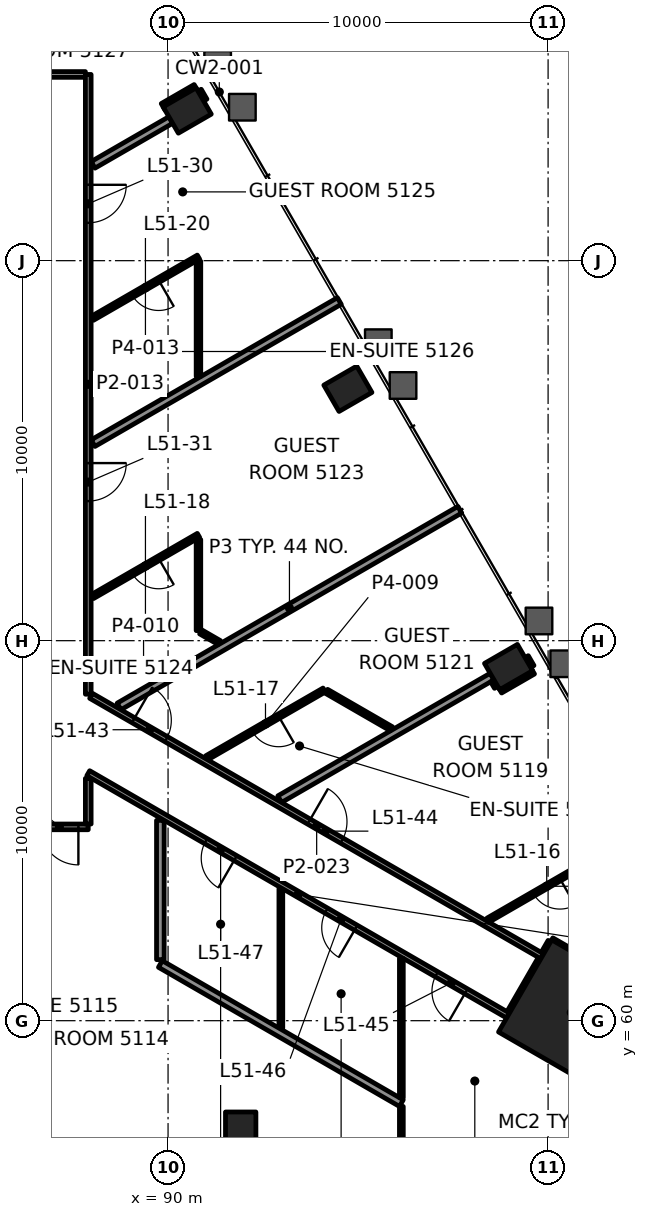
"""IFC4 building model, lengths in metres.
Left out: names, types, materials, properties, quantities, classifications, styles, units other than length and angle.
Written with IfcOpenShell. Run it as: python <this file> out.ifc"""

import sys

from ifc_helpers import new_model, si_unit, direction, frame, frame_2d, origin, origin_2d, place, context, subcontext, project, spatial, rectangle, hollow_rectangle, extrude, element, fill, save


model = new_model("IFC4")
c1 = context("Model", 3, precision=1e-05, world=origin(), true_north=direction((0.0, 1.0)))
c2 = subcontext(c1, "Body", "Model", "MODEL_VIEW")
j1 = project(units=[si_unit("LENGTHUNIT", "METRE"), si_unit("PLANEANGLEUNIT", "RADIAN")], contexts=[c1])
p1 = place(None, origin())
s1 = spatial("IfcSite", under=j1, at=p1, CompositionType="ELEMENT")
p2 = place(p1, origin())
s2 = spatial("IfcBuilding", under=s1, at=p2, CompositionType="ELEMENT")
p3 = place(p2, frame((0.0, 0.0, 218.2)))
s3 = spatial("IfcBuildingStorey", under=s2, at=p3, CompositionType="ELEMENT", Elevation=218.2)
p4 = place(p3, frame((100.608, 60.215, 0.0), z_axis=(0.0, 0.0, 1.0), x_axis=(0.5, 0.866025403784, 0.0)))
e1 = element("IfcColumn", 1, at=p4, inside=s3, PredefinedType="COLUMN", context=c2, shape_type="SweptSolid", body=[
    extrude(rectangle(XDim=2.8, YDim=2.8, at=origin_2d()), origin(), (0.0, 0.0, 1.0), 3.9),
])
for number, where, z_axis, x_axis in (
    (2, (91.911, 57.097, -0.0), (0.0, 0.0, 1.0), (1.0, 0.0, 0.0)),
    (3, (98.96, 69.306, -0.0), (0.0, 0.0, 1.0), (-0.5, 0.866, 0.0)),
    (4, (94.732, 76.628, -0.0), (0.0, 0.0, 1.0), (-0.5, 0.866, 0.0)),
    (5, (90.504, 83.951, -0.0), (0.0, 0.0, 1.0), (-0.5, 0.866, 0.0)),
):
    element("IfcColumn", number, at=place(p3, frame(where, z_axis=z_axis, x_axis=x_axis)), inside=s3, PredefinedType="COLUMN", context=c2, shape_type="SweptSolid", body=[
        extrude(hollow_rectangle(XDim=0.8, YDim=1.0, WallThickness=0.05, at=origin_2d()), origin(), (0.0, 0.0, 1.0), 3.9),
    ])
p5 = place(p3, frame((87.899, 65.1, 0.0), z_axis=(0.0, 0.0, 1.0), x_axis=(-1.0, 0.0, 0.0)))
e6 = element("IfcWall", 6, at=p5, inside=s3, PredefinedType="PARTITIONING", context=c2, shape_type="SweptSolid", body=[
    extrude(rectangle(XDim=25.799, YDim=0.15, at=frame_2d((12.899, 0.0))), origin(), (0.0, 0.0, 1.0), 3.1),
])
p6 = place(p5, frame((0.259, 0.0, 0.0)))
e7 = element("IfcOpeningElement", 7, at=p6, cuts=e6, PredefinedType="OPENING", context=c2, shape_type="SweptSolid", body=[
    extrude(rectangle(XDim=1.0, YDim=2.1, at=frame_2d((0.5, 1.05))), frame((0.0, 0.085, 0.0), z_axis=(0.0, -1.0, 0.0), x_axis=(1.0, 0.0, 0.0)), (0.0, 0.0, 1.0), 0.17),
])
p7 = place(p5, frame((4.641, 0.0, 0.0)))
e8 = element("IfcOpeningElement", 8, at=p7, cuts=e6, PredefinedType="OPENING", context=c2, shape_type="SweptSolid", body=[
    extrude(rectangle(XDim=1.0, YDim=2.1, at=frame_2d((0.5, 1.05))), frame((0.0, 0.085, 0.0), z_axis=(0.0, -1.0, 0.0), x_axis=(1.0, 0.0, 0.0)), (0.0, 0.0, 1.0), 0.17),
])
p8 = place(p5, frame((8.868, 0.0, 0.0)))
e9 = element("IfcOpeningElement", 9, at=p8, cuts=e6, PredefinedType="OPENING", context=c2, shape_type="SweptSolid", body=[
    extrude(rectangle(XDim=1.0, YDim=2.1, at=frame_2d((0.5, 1.05))), frame((0.0, 0.085, 0.0), z_axis=(0.0, -1.0, 0.0), x_axis=(1.0, 0.0, 0.0)), (0.0, 0.0, 1.0), 0.17),
])
p9 = place(p5, frame((13.271, 0.0, 0.0)))
e10 = element("IfcOpeningElement", 10, at=p9, cuts=e6, PredefinedType="OPENING", context=c2, shape_type="SweptSolid", body=[
    extrude(rectangle(XDim=1.0, YDim=2.1, at=frame_2d((0.5, 1.05))), frame((0.0, 0.085, 0.0), z_axis=(0.0, -1.0, 0.0), x_axis=(1.0, 0.0, 0.0)), (0.0, 0.0, 1.0), 0.17),
])
p10 = place(p5, frame((19.612, 0.0, 0.0)))
e11 = element("IfcOpeningElement", 11, at=p10, cuts=e6, PredefinedType="OPENING", context=c2, shape_type="SweptSolid", body=[
    extrude(rectangle(XDim=1.0, YDim=2.1, at=frame_2d((0.5, 1.05))), frame((0.0, 0.085, 0.0), z_axis=(0.0, -1.0, 0.0), x_axis=(1.0, 0.0, 0.0)), (0.0, 0.0, 1.0), 0.17),
])
p11 = place(p3, frame((78.275, 84.9, 0.0), z_axis=(0.0, 0.0, 1.0), x_axis=(1.0, 0.0, 0.0)))
e12 = element("IfcWall", 12, at=p11, inside=s3, PredefinedType="PARTITIONING", context=c2, shape_type="SweptSolid", body=[
    extrude(rectangle(XDim=9.55, YDim=0.15, at=frame_2d((4.775, 0.0))), origin(), (0.0, 0.0, 1.0), 3.097),
])
p12 = place(p11, frame((5.191, 0.0, 0.0)))
e13 = element("IfcOpeningElement", 13, at=p12, cuts=e12, PredefinedType="OPENING", context=c2, shape_type="SweptSolid", body=[
    extrude(rectangle(XDim=1.0, YDim=2.1, at=frame_2d((0.5, 1.05))), frame((0.0, 0.085, 0.0), z_axis=(0.0, -1.0, 0.0), x_axis=(1.0, 0.0, 0.0)), (0.0, 0.0, 1.0), 0.17),
])
p13 = place(p3, frame((101.509, 64.429, 0.0), z_axis=(0.0, 0.0, 1.0), x_axis=(-0.866028357664, -0.499994883695, 0.0)))
e14 = element("IfcWall", 14, at=p13, inside=s3, PredefinedType="PARTITIONING", context=c2, shape_type="SweptSolid", body=[
    extrude(rectangle(XDim=3.568, YDim=0.12, at=frame_2d((1.784, 0.0))), origin(), (0.0, 0.0, 1.0), 3.1),
])
p14 = place(p13, frame((1.384, 0.0, 0.0)))
e15 = element("IfcOpeningElement", 15, at=p14, cuts=e14, PredefinedType="OPENING", context=c2, shape_type="SweptSolid", body=[
    extrude(rectangle(XDim=0.8, YDim=2.1, at=frame_2d((0.4, 1.05))), frame((0.0, 0.07, 0.0), z_axis=(0.0, -1.0, 0.0), x_axis=(1.0, 0.0, 0.0)), (0.0, 0.0, 1.0), 0.14),
])
p15 = place(p3, frame((98.727, 68.71, 0.0), z_axis=(0.0, 0.0, 1.0), x_axis=(0.866083827272, 0.499898793895, 0.0)))
e16 = element("IfcWall", 16, at=p15, inside=s3, PredefinedType="PARTITIONING", context=c2, shape_type="SweptSolid", body=[
    extrude(rectangle(XDim=0.999, YDim=0.2, at=frame_2d((0.5, 0.0))), origin(), (0.0, 0.0, 1.0), 3.1),
])
p16 = place(p3, frame((92.938, 65.83, 0.0), z_axis=(0.0, 0.0, 1.0), x_axis=(0.866041300655, 0.499972464802, 0.0)))
e17 = element("IfcWall", 17, at=p16, inside=s3, PredefinedType="PARTITIONING", context=c2, shape_type="SweptSolid", body=[
    extrude(rectangle(XDim=6.452, YDim=0.2, at=frame_2d((3.226, 0.0))), origin(), (0.0, 0.0, 1.0), 3.1),
])
p17 = place(p3, frame((94.109, 68.702, 0.0), z_axis=(0.0, 0.0, 1.0), x_axis=(-0.866028357664, -0.499994883695, 0.0)))
e18 = element("IfcWall", 18, at=p17, inside=s3, PredefinedType="PARTITIONING", context=c2, shape_type="SweptSolid", body=[
    extrude(rectangle(XDim=3.568, YDim=0.12, at=frame_2d((1.784, 0.0))), origin(), (0.0, 0.0, 1.0), 3.1),
])
p18 = place(p17, frame((1.384, 0.0, 0.0)))
e19 = element("IfcOpeningElement", 19, at=p18, cuts=e18, PredefinedType="OPENING", context=c2, shape_type="SweptSolid", body=[
    extrude(rectangle(XDim=0.8, YDim=2.1, at=frame_2d((0.4, 1.05))), frame((0.0, 0.07, 0.0), z_axis=(0.0, -1.0, 0.0), x_axis=(1.0, 0.0, 0.0)), (0.0, 0.0, 1.0), 0.14),
])
p19 = place(p3, frame((88.711, 68.27, 0.0), z_axis=(0.0, 0.0, 1.0), x_axis=(0.866024593981, 0.500001402618, 0.0)))
e20 = element("IfcWall", 20, at=p19, inside=s3, PredefinedType="PARTITIONING", context=c2, shape_type="SweptSolid", body=[
    extrude(rectangle(XDim=10.354, YDim=0.2, at=frame_2d((5.177, 0.0))), origin(), (0.0, 0.0, 1.0), 3.022),
])
p20 = place(p3, frame((90.8, 72.771, 0.0), z_axis=(0.0, 0.0, 1.0), x_axis=(-0.86604299788, -0.499969524894, 0.0)))
e21 = element("IfcWall", 21, at=p20, inside=s3, PredefinedType="PARTITIONING", context=c2, shape_type="SweptSolid", body=[
    extrude(rectangle(XDim=3.222, YDim=0.12, at=frame_2d((1.611, 0.0))), origin(), (0.0, 0.0, 1.0), 3.1),
])
p21 = place(p20, frame((1.211, 0.0, 0.0)))
e22 = element("IfcOpeningElement", 22, at=p21, cuts=e21, PredefinedType="OPENING", context=c2, shape_type="SweptSolid", body=[
    extrude(rectangle(XDim=0.8, YDim=2.1, at=frame_2d((0.4, 1.05))), frame((0.0, 0.07, 0.0), z_axis=(0.0, -1.0, 0.0), x_axis=(1.0, 0.0, 0.0)), (0.0, 0.0, 1.0), 0.14),
])
p22 = place(p3, frame((88.027, 75.198, 0.0), z_axis=(0.0, 0.0, 1.0), x_axis=(0.866029625778, 0.499992687221, 0.0)))
e23 = element("IfcWall", 23, at=p22, inside=s3, PredefinedType="PARTITIONING", context=c2, shape_type="SweptSolid", body=[
    extrude(rectangle(XDim=7.481, YDim=0.2, at=frame_2d((3.741, 0.0))), origin(), (0.0, 0.0, 1.0), 3.022),
])
p23 = place(p3, frame((90.8, 80.095, 0.0), z_axis=(0.0, 0.0, 1.0), x_axis=(-0.866029130051, -0.499993545862, 0.0)))
e24 = element("IfcWall", 24, at=p23, inside=s3, PredefinedType="PARTITIONING", context=c2, shape_type="SweptSolid", body=[
    extrude(rectangle(XDim=3.222, YDim=0.12, at=frame_2d((1.611, 0.0))), origin(), (0.0, 0.0, 1.0), 3.1),
])
p24 = place(p23, frame((1.211, 0.0, 0.0)))
e25 = element("IfcOpeningElement", 25, at=p24, cuts=e24, PredefinedType="OPENING", context=c2, shape_type="SweptSolid", body=[
    extrude(rectangle(XDim=0.8, YDim=2.1, at=frame_2d((0.4, 1.05))), frame((0.0, 0.07, 0.0), z_axis=(0.0, -1.0, 0.0), x_axis=(1.0, 0.0, 0.0)), (0.0, 0.0, 1.0), 0.14),
])
p25 = place(p3, frame((88.027, 82.521, 0.0), z_axis=(0.0, 0.0, 1.0), x_axis=(0.866032292145, 0.49998806882, 0.0)))
e26 = element("IfcWall", 26, at=p25, inside=s3, PredefinedType="PARTITIONING", context=c2, shape_type="SweptSolid", body=[
    extrude(rectangle(XDim=2.36, YDim=0.2, at=frame_2d((1.18, 0.0))), origin(), (0.0, 0.0, 1.0), 3.1),
])
p26 = place(p3, frame((89.871, 84.048, 0.0), z_axis=(0.0, 0.0, 1.0), x_axis=(0.866010750942, 0.50002537861, 0.0)))
e27 = element("IfcWall", 27, at=p26, inside=s3, PredefinedType="PARTITIONING", context=c2, shape_type="SweptSolid", body=[
    extrude(rectangle(XDim=1.0, YDim=0.2, at=frame_2d((0.5, 0.0))), origin(), (0.0, 0.0, 1.0), 3.022),
])
p27 = place(p3, frame((98.984, 60.201, 0.0), z_axis=(0.0, 0.0, 1.0), x_axis=(0.499991515992, 0.866030301974, 0.0)))
e28 = element("IfcWall", 28, at=p27, inside=s3, PredefinedType="PARTITIONING", context=c2, shape_type="SweptSolid", body=[
    extrude(rectangle(XDim=1.649, YDim=0.15, at=frame_2d((0.825, 0.0))), origin(), (0.0, 0.0, 1.0), 2.947),
])
p28 = place(p3, frame((96.139, 56.137, 0.0), z_axis=(0.0, 0.0, 1.0), x_axis=(0.0, 1.0, 0.0)))
e29 = element("IfcWall", 29, at=p28, inside=s3, PredefinedType="PARTITIONING", context=c2, shape_type="SweptSolid", body=[
    extrude(rectangle(XDim=1.606, YDim=0.1, at=frame_2d((0.803, 0.0))), origin(), (0.0, 0.0, 1.0), 3.1),
])
p29 = place(p3, frame((92.968, 59.806, 0.0), z_axis=(0.0, 0.0, 1.0), x_axis=(0.0, 1.0, 0.0)))
e30 = element("IfcWall", 30, at=p29, inside=s3, PredefinedType="PARTITIONING", context=c2, shape_type="SweptSolid", body=[
    extrude(rectangle(XDim=3.664, YDim=0.1, at=frame_2d((1.832, 0.0))), origin(), (0.0, 0.0, 1.0), 3.1),
])
p30 = place(p3, frame((90.8, 70.266, 0.0), z_axis=(0.0, 0.0, 1.0), x_axis=(0.0, 1.0, 0.0)))
e31 = element("IfcWall", 31, at=p30, inside=s3, PredefinedType="PARTITIONING", context=c2, shape_type="SweptSolid", body=[
    extrude(rectangle(XDim=2.397, YDim=0.12, at=frame_2d((1.198, 0.0))), origin(), (0.0, 0.0, 1.0), 3.1),
])
p31 = place(p3, frame((90.8, 76.955, 0.0), z_axis=(0.0, 0.0, 1.0), x_axis=(0.0, 1.0, 0.0)))
e32 = element("IfcWall", 32, at=p31, inside=s3, PredefinedType="PARTITIONING", context=c2, shape_type="SweptSolid", body=[
    extrude(rectangle(XDim=3.031, YDim=0.12, at=frame_2d((1.515, 0.0))), origin(), (0.0, 0.0, 1.0), 3.1),
])
p32 = place(p3, frame((89.797, 61.607, 0.0), z_axis=(0.0, 0.0, 1.0), x_axis=(0.0, 1.0, 0.0)))
e33 = element("IfcWall", 33, at=p32, inside=s3, PredefinedType="PARTITIONING", context=c2, shape_type="SweptSolid", body=[
    extrude(rectangle(XDim=3.664, YDim=0.2, at=frame_2d((1.832, 0.0))), origin(), (0.0, 0.0, 1.0), 2.947),
])
p33 = place(p3, frame((87.9, 65.176, 0.0), z_axis=(0.0, 0.0, 1.0), x_axis=(0.0, 1.0, 0.0)))
e34 = element("IfcWall", 34, at=p33, inside=s3, PredefinedType="PARTITIONING", context=c2, shape_type="SweptSolid", body=[
    extrude(rectangle(XDim=1.201, YDim=0.15, at=frame_2d((0.6, 0.0))), origin(), (0.0, 0.0, 1.0), 2.947),
])
p34 = place(p3, frame((87.9, 84.9, 0.0), z_axis=(0.0, 0.0, 1.0), x_axis=(0.0, -1.0, 0.0)))
e35 = element("IfcWall", 35, at=p34, inside=s3, PredefinedType="PARTITIONING", context=c2, shape_type="SweptSolid", body=[
    extrude(rectangle(XDim=16.309, YDim=0.15, at=frame_2d((8.154, 0.0))), origin(), (0.0, 0.0, 1.0), 3.1),
])
p35 = place(p34, frame((2.904, 0.0, 0.0)))
e36 = element("IfcOpeningElement", 36, at=p35, cuts=e35, PredefinedType="OPENING", context=c2, shape_type="SweptSolid", body=[
    extrude(rectangle(XDim=1.0, YDim=2.1, at=frame_2d((0.5, 1.05))), frame((0.0, 0.085, 0.0), z_axis=(0.0, -1.0, 0.0), x_axis=(1.0, 0.0, 0.0)), (0.0, 0.0, 1.0), 0.17),
])
p36 = place(p34, frame((10.227, 0.0, 0.0)))
e37 = element("IfcOpeningElement", 37, at=p36, cuts=e35, PredefinedType="OPENING", context=c2, shape_type="SweptSolid", body=[
    extrude(rectangle(XDim=1.0, YDim=2.1, at=frame_2d((0.5, 1.05))), frame((0.0, 0.085, 0.0), z_axis=(0.0, -1.0, 0.0), x_axis=(1.0, 0.0, 0.0)), (0.0, 0.0, 1.0), 0.17),
])
p37 = place(p3, frame((99.542, 69.296, 0.0), z_axis=(0.0, 0.0, 1.0), x_axis=(-0.500005339912, 0.866022320763, 0.0)))
e38 = element("IfcWall", 38, at=p37, inside=s3, PredefinedType="PARTITIONING", context=c2, shape_type="SweptSolid", body=[
    extrude(rectangle(XDim=0.299, YDim=0.2, at=frame_2d((0.149, 0.0))), origin(), (0.0, 0.0, 1.0), 3.1),
])
p38 = place(p3, frame((90.937, 84.201, 0.0), z_axis=(0.0, 0.0, 1.0), x_axis=(-0.500074377092, 0.865982457891, 0.0)))
e39 = element("IfcWall", 39, at=p38, inside=s3, PredefinedType="PARTITIONING", context=c2, shape_type="SweptSolid", body=[
    extrude(rectangle(XDim=0.3, YDim=0.2, at=frame_2d((0.15, 0.0))), origin(), (0.0, 0.0, 1.0), 3.1),
])
p39 = place(p3, frame((98.676, 68.796, 0.0), z_axis=(0.0, 0.0, 1.0), x_axis=(-0.4999705729, 0.866042392862, 0.0)))
e40 = element("IfcWall", 40, at=p39, inside=s3, PredefinedType="PARTITIONING", context=c2, shape_type="SweptSolid", body=[
    extrude(rectangle(XDim=0.199, YDim=0.2, at=frame_2d((0.099, 0.0))), origin(), (0.0, 0.0, 1.0), 3.1),
])
p40 = place(p3, frame((95.877, 67.681, 0.0), z_axis=(0.0, 0.0, 1.0), x_axis=(-0.866002090371, 0.500040377843, 0.0)))
e41 = element("IfcWall", 41, at=p40, inside=s3, PredefinedType="PARTITIONING", context=c2, shape_type="SweptSolid", body=[
    extrude(rectangle(XDim=1.972, YDim=0.12, at=frame_2d((0.986, 0.0))), origin(), (0.0, 0.0, 1.0), 3.1),
])
p41 = place(p3, frame((91.349, 69.949, 0.0), z_axis=(0.0, 0.0, 1.0), x_axis=(-0.865998287773, 0.500046963369, 0.0)))
e42 = element("IfcWall", 42, at=p41, inside=s3, PredefinedType="PARTITIONING", context=c2, shape_type="SweptSolid", body=[
    extrude(rectangle(XDim=0.564, YDim=0.12, at=frame_2d((0.282, 0.0))), origin(), (0.0, 0.0, 1.0), 3.1),
])
p42 = place(p3, frame((102.919, 60.498, 0.0), z_axis=(0.0, 0.0, 1.0), x_axis=(-0.866003472149, 0.500037984783, 0.0)))
e43 = element("IfcWall", 43, at=p42, inside=s3, PredefinedType="PARTITIONING", context=c2, shape_type="SweptSolid", body=[
    extrude(rectangle(XDim=3.26, YDim=0.12, at=frame_2d((1.63, 0.0))), origin(), (0.0, 0.0, 1.0), 3.1),
])
p43 = place(p3, frame((87.975, 68.548, 0.0), z_axis=(0.0, 0.0, 1.0), x_axis=(0.866024823711, -0.500001004715, 0.0)))
e44 = element("IfcWall", 44, at=p43, inside=s3, PredefinedType="PARTITIONING", context=c2, shape_type="SweptSolid", body=[
    extrude(rectangle(XDim=13.707, YDim=0.15, at=frame_2d((6.854, 0.0))), origin(), (0.0, 0.0, 1.0), 3.1),
])
p44 = place(p43, frame((1.283, 0.0, 0.0)))
e45 = element("IfcOpeningElement", 45, at=p44, cuts=e44, PredefinedType="OPENING", context=c2, shape_type="SweptSolid", body=[
    extrude(rectangle(XDim=1.0, YDim=2.1, at=frame_2d((0.5, 1.05))), frame((0.0, 0.085, 0.0), z_axis=(0.0, -1.0, 0.0), x_axis=(1.0, 0.0, 0.0)), (0.0, 0.0, 1.0), 0.17),
])
p45 = place(p43, frame((6.62, 0.0, 0.0)))
e46 = element("IfcOpeningElement", 46, at=p45, cuts=e44, PredefinedType="OPENING", context=c2, shape_type="SweptSolid", body=[
    extrude(rectangle(XDim=1.0, YDim=2.1, at=frame_2d((0.5, 1.05))), frame((0.0, 0.085, 0.0), z_axis=(0.0, -1.0, 0.0), x_axis=(1.0, 0.0, 0.0)), (0.0, 0.0, 1.0), 0.17),
])
p46 = place(p3, frame((98.945, 60.136, 0.0), z_axis=(0.0, 0.0, 1.0), x_axis=(-0.866024604137, 0.500001385028, 0.0)))
e47 = element("IfcWall", 47, at=p46, inside=s3, PredefinedType="PARTITIONING", context=c2, shape_type="SweptSolid", body=[
    extrude(rectangle(XDim=12.754, YDim=0.15, at=frame_2d((6.377, 0.0))), origin(), (0.0, 0.0, 1.0), 2.947),
])
p47 = place(p46, frame((1.271, 0.0, 0.0)))
e48 = element("IfcOpeningElement", 48, at=p47, cuts=e47, PredefinedType="OPENING", context=c2, shape_type="SweptSolid", body=[
    extrude(rectangle(XDim=0.9, YDim=2.1, at=frame_2d((0.45, 1.05))), frame((0.0, 0.085, 0.0), z_axis=(0.0, -1.0, 0.0), x_axis=(1.0, 0.0, 0.0)), (0.0, 0.0, 1.0), 0.17),
])
p48 = place(p46, frame((4.621, 0.0, 0.0)))
e49 = element("IfcOpeningElement", 49, at=p48, cuts=e47, PredefinedType="OPENING", context=c2, shape_type="SweptSolid", body=[
    extrude(rectangle(XDim=0.9, YDim=2.1, at=frame_2d((0.45, 1.05))), frame((0.0, 0.085, 0.0), z_axis=(0.0, -1.0, 0.0), x_axis=(1.0, 0.0, 0.0)), (0.0, 0.0, 1.0), 0.17),
])
p49 = place(p46, frame((8.282, 0.0, 0.0)))
e50 = element("IfcOpeningElement", 50, at=p49, cuts=e47, PredefinedType="OPENING", context=c2, shape_type="SweptSolid", body=[
    extrude(rectangle(XDim=0.9, YDim=2.1, at=frame_2d((0.45, 1.05))), frame((0.0, 0.085, 0.0), z_axis=(0.0, -1.0, 0.0), x_axis=(1.0, 0.0, 0.0)), (0.0, 0.0, 1.0), 0.17),
])
p50 = place(p3, frame((96.139, 57.83, 0.0), z_axis=(0.0, 0.0, 1.0), x_axis=(-0.866014584968, 0.500018738272, 0.0)))
e51 = element("IfcWall", 51, at=p50, inside=s3, PredefinedType="PARTITIONING", context=c2, shape_type="SweptSolid", body=[
    extrude(rectangle(XDim=7.323, YDim=0.2, at=frame_2d((3.662, 0.0))), origin(), (0.0, 0.0, 1.0), 3.1),
])
p51 = place(p3, frame((99.884, 61.76, 0.0), z_axis=(0.0, 0.0, 1.0), x_axis=(0.500031897912, 0.866006986733, 0.0)))
e52 = element("IfcWall", 52, at=p51, inside=s3, PredefinedType="PARTITIONING", context=c2, shape_type="SweptSolid", body=[
    extrude(rectangle(XDim=0.364, YDim=0.15, at=frame_2d((0.182, 0.0))), origin(), (0.0, 0.0, 1.0), 3.1),
])
p52 = place(p3, frame((96.139, 57.975, 0.0), z_axis=(0.0, 0.0, 1.0), x_axis=(0.0, 1.0, 0.0)))
e53 = element("IfcWall", 53, at=p52, inside=s3, PredefinedType="PARTITIONING", context=c2, shape_type="SweptSolid", body=[
    extrude(rectangle(XDim=3.665, YDim=0.1, at=frame_2d((1.833, 0.0))), origin(), (0.0, 0.0, 1.0), 3.1),
])
p53 = place(p6, origin())
e54 = element("IfcDoor", 54, at=p53, inside=s3, OperationType="SINGLE_SWING_RIGHT", PredefinedType="DOOR", context=c2, shape_type="SweptSolid", body=[
    extrude(rectangle(XDim=1.0, YDim=2.1, at=frame_2d((0.5, 1.05))), frame((0.0, 0.025, 0.0), z_axis=(0.0, -1.0, 0.0), x_axis=(1.0, 0.0, 0.0)), (0.0, 0.0, 1.0), 0.05),
])
fill(e7, e54)
p54 = place(p14, origin())
e55 = element("IfcDoor", 55, at=p54, inside=s3, OperationType="SINGLE_SWING_RIGHT", PredefinedType="DOOR", context=c2, shape_type="SweptSolid", body=[
    extrude(rectangle(XDim=0.8, YDim=2.1, at=frame_2d((0.4, 1.05))), frame((0.0, 0.025, 0.0), z_axis=(0.0, -1.0, 0.0), x_axis=(1.0, 0.0, 0.0)), (0.0, 0.0, 1.0), 0.05),
])
fill(e15, e55)
p55 = place(p18, origin())
e56 = element("IfcDoor", 56, at=p55, inside=s3, OperationType="SINGLE_SWING_RIGHT", PredefinedType="DOOR", context=c2, shape_type="SweptSolid", body=[
    extrude(rectangle(XDim=0.8, YDim=2.1, at=frame_2d((0.4, 1.05))), frame((0.0, 0.025, 0.0), z_axis=(0.0, -1.0, 0.0), x_axis=(1.0, 0.0, 0.0)), (0.0, 0.0, 1.0), 0.05),
])
fill(e19, e56)
p56 = place(p21, origin())
e57 = element("IfcDoor", 57, at=p56, inside=s3, OperationType="SINGLE_SWING_RIGHT", PredefinedType="DOOR", context=c2, shape_type="SweptSolid", body=[
    extrude(rectangle(XDim=0.8, YDim=2.1, at=frame_2d((0.4, 1.05))), frame((0.0, 0.025, 0.0), z_axis=(0.0, -1.0, 0.0), x_axis=(1.0, 0.0, 0.0)), (0.0, 0.0, 1.0), 0.05),
])
fill(e22, e57)
p57 = place(p24, origin())
e58 = element("IfcDoor", 58, at=p57, inside=s3, OperationType="SINGLE_SWING_RIGHT", PredefinedType="DOOR", context=c2, shape_type="SweptSolid", body=[
    extrude(rectangle(XDim=0.8, YDim=2.1, at=frame_2d((0.4, 1.05))), frame((0.0, 0.025, 0.0), z_axis=(0.0, -1.0, 0.0), x_axis=(1.0, 0.0, 0.0)), (0.0, 0.0, 1.0), 0.05),
])
fill(e25, e58)
p58 = place(p35, origin())
e59 = element("IfcDoor", 59, at=p58, inside=s3, OperationType="SINGLE_SWING_LEFT", PredefinedType="DOOR", context=c2, shape_type="SweptSolid", body=[
    extrude(rectangle(XDim=1.0, YDim=2.1, at=frame_2d((0.5, 1.05))), frame((0.0, 0.025, 0.0), z_axis=(0.0, -1.0, 0.0), x_axis=(1.0, 0.0, 0.0)), (0.0, 0.0, 1.0), 0.05),
])
fill(e36, e59)
p59 = place(p36, origin())
e60 = element("IfcDoor", 60, at=p59, inside=s3, OperationType="SINGLE_SWING_LEFT", PredefinedType="DOOR", context=c2, shape_type="SweptSolid", body=[
    extrude(rectangle(XDim=1.0, YDim=2.1, at=frame_2d((0.5, 1.05))), frame((0.0, 0.025, 0.0), z_axis=(0.0, -1.0, 0.0), x_axis=(1.0, 0.0, 0.0)), (0.0, 0.0, 1.0), 0.05),
])
fill(e37, e60)
p60 = place(p44, origin())
e61 = element("IfcDoor", 61, at=p60, inside=s3, OperationType="SINGLE_SWING_LEFT", PredefinedType="DOOR", context=c2, shape_type="SweptSolid", body=[
    extrude(rectangle(XDim=1.0, YDim=2.1, at=frame_2d((0.5, 1.05))), frame((0.0, 0.025, 0.0), z_axis=(0.0, -1.0, 0.0), x_axis=(1.0, 0.0, 0.0)), (0.0, 0.0, 1.0), 0.05),
])
fill(e45, e61)
p61 = place(p45, origin())
e62 = element("IfcDoor", 62, at=p61, inside=s3, OperationType="SINGLE_SWING_LEFT", PredefinedType="DOOR", context=c2, shape_type="SweptSolid", body=[
    extrude(rectangle(XDim=1.0, YDim=2.1, at=frame_2d((0.5, 1.05))), frame((0.0, 0.025, 0.0), z_axis=(0.0, -1.0, 0.0), x_axis=(1.0, 0.0, 0.0)), (0.0, 0.0, 1.0), 0.05),
])
fill(e46, e62)
p62 = place(p47, origin())
e63 = element("IfcDoor", 63, at=p62, inside=s3, OperationType="SINGLE_SWING_LEFT", PredefinedType="DOOR", context=c2, shape_type="SweptSolid", body=[
    extrude(rectangle(XDim=0.9, YDim=2.1, at=frame_2d((0.45, 1.05))), frame((0.0, 0.025, 0.0), z_axis=(0.0, -1.0, 0.0), x_axis=(1.0, 0.0, 0.0)), (0.0, 0.0, 1.0), 0.05),
])
fill(e48, e63)
p63 = place(p48, origin())
e64 = element("IfcDoor", 64, at=p63, inside=s3, OperationType="SINGLE_SWING_RIGHT", PredefinedType="DOOR", context=c2, shape_type="SweptSolid", body=[
    extrude(rectangle(XDim=0.9, YDim=2.1, at=frame_2d((0.45, 1.05))), frame((0.0, 0.025, 0.0), z_axis=(0.0, -1.0, 0.0), x_axis=(1.0, 0.0, 0.0)), (0.0, 0.0, 1.0), 0.05),
])
fill(e49, e64)
p64 = place(p49, origin())
e65 = element("IfcDoor", 65, at=p64, inside=s3, OperationType="SINGLE_SWING_LEFT", PredefinedType="DOOR", context=c2, shape_type="SweptSolid", body=[
    extrude(rectangle(XDim=0.9, YDim=2.1, at=frame_2d((0.45, 1.05))), frame((0.0, 0.025, 0.0), z_axis=(0.0, -1.0, 0.0), x_axis=(1.0, 0.0, 0.0)), (0.0, 0.0, 1.0), 0.05),
])
fill(e50, e65)
save(model, sys.argv[1])
